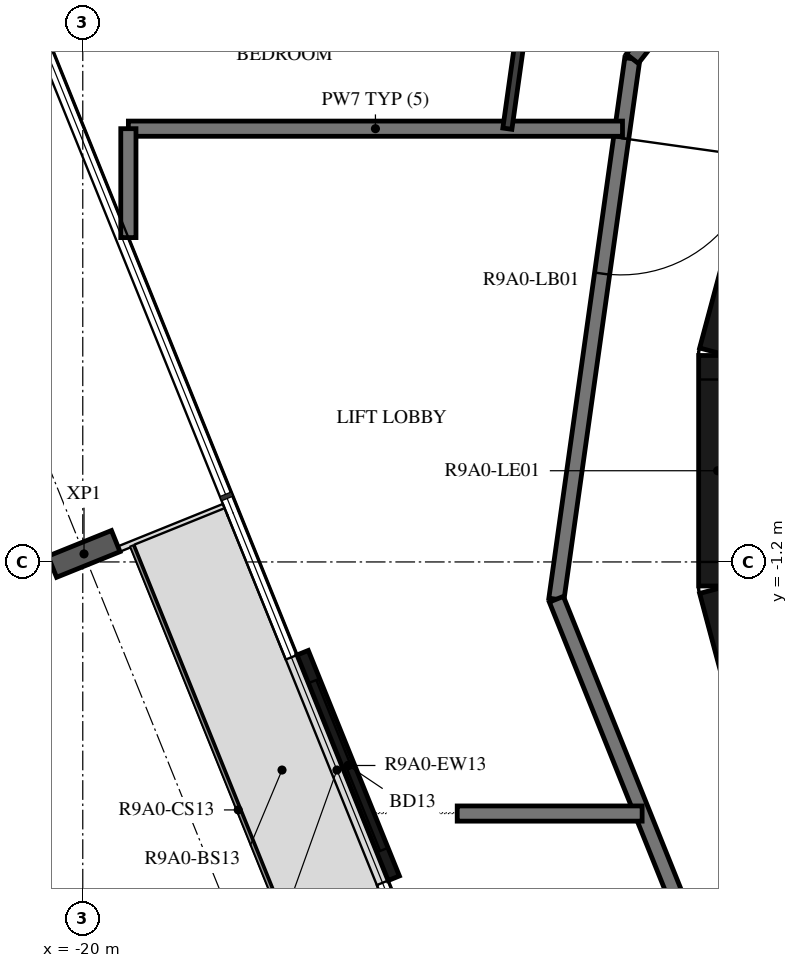
"""IFC4 building model, lengths in metres.
Left out: names, types, materials, properties, quantities, classifications, styles, units other than length and angle.
Written with IfcOpenShell. Run it as: python <this file> out.ifc"""

import sys

from ifc_helpers import new_model, si_unit, direction, frame, frame_2d, origin, origin_2d, place, context, subcontext, project, spatial, rectangle, i_section, extrude, element, fill, save


model = new_model("IFC4")
c1 = context("Model", 3, precision=1e-05, world=origin(), true_north=direction((0.0, 1.0)))
c2 = subcontext(c1, "Body", "Model", "MODEL_VIEW")
j1 = project(units=[si_unit("LENGTHUNIT", "METRE"), si_unit("PLANEANGLEUNIT", "RADIAN")], contexts=[c1])
p1 = place(None, origin())
s1 = spatial("IfcSite", under=j1, at=p1, CompositionType="ELEMENT")
p2 = place(p1, origin())
s2 = spatial("IfcBuilding", under=s1, at=p2, CompositionType="ELEMENT")
p3 = place(p2, frame((0.0, 0.0, 340.0)))
s3 = spatial("IfcBuildingStorey", under=s2, at=p3, CompositionType="ELEMENT", Elevation=340.0)
p4 = place(p3, frame((-19.984, -1.094, -0.38), z_axis=(0.0, 0.0, 1.0), x_axis=(-0.374606892434, 0.927183733755, 0.0)))
e1 = element("IfcColumn", 1, at=p4, inside=s3, PredefinedType="COLUMN", context=c2, shape_type="SweptSolid", body=[
    extrude(i_section(OverallWidth=0.3, OverallDepth=0.9, WebThickness=0.019, FlangeThickness=0.035, FilletRadius=0.03, at=origin_2d()), origin(), (0.0, 0.0, 1.0), 3.5),
])
p5 = place(p3, frame((-17.107, -2.394, 0.0), z_axis=(0.0, 0.0, 1.0), x_axis=(0.374598019739, -0.927187318511, 0.0)))
e2 = element("IfcWall", 2, at=p5, inside=s3, PredefinedType="STANDARD", context=c2, shape_type="SweptSolid", body=[
    extrude(rectangle(XDim=3.2, YDim=0.16, at=frame_2d((1.6, 0.0))), origin(), (0.0, 0.0, 1.0), 3.12),
])
p6 = place(p5, frame((0.4, 0.0, 0.0)))
e3 = element("IfcOpeningElement", 3, at=p6, cuts=e2, PredefinedType="OPENING", context=c2, shape_type="SweptSolid", body=[
    extrude(rectangle(XDim=2.4, YDim=2.4, at=frame_2d((1.2, 1.2))), frame((0.0, 0.09, 0.0), z_axis=(0.0, -1.0, 0.0), x_axis=(1.0, 0.0, 0.0)), (0.0, 0.0, 1.0), 0.18),
])
p7 = place(p3, frame((-10.858, 4.479, 0.0), z_axis=(0.0, 0.0, 1.0), x_axis=(-0.258734743916, -0.965948410781, 0.0)))
e4 = element("IfcWall", 4, at=p7, inside=s3, PredefinedType="SHEAR", context=c2, shape_type="SweptSolid", body=[
    extrude(rectangle(XDim=3.033, YDim=0.5, at=frame_2d((1.516, 0.0))), origin(), (0.0, 0.0, 1.0), 3.12),
])
p8 = place(p3, frame((-11.647, 1.516, 0.0), z_axis=(0.0, 0.0, 1.0), x_axis=(0.0, -1.0, 0.0)))
e5 = element("IfcWall", 5, at=p8, inside=s3, PredefinedType="SHEAR", context=c2, shape_type="SweptSolid", body=[
    extrude(rectangle(XDim=3.033, YDim=0.5, at=frame_2d((1.516, 0.0))), origin(), (0.0, 0.0, 1.0), 3.12),
])
p9 = place(p8, frame((0.316, 0.0, 0.0)))
e6 = element("IfcOpeningElement", 6, at=p9, cuts=e5, PredefinedType="OPENING", context=c2, shape_type="SweptSolid", body=[
    extrude(rectangle(XDim=2.4, YDim=2.1, at=frame_2d((1.2, 1.05))), frame((0.0, 0.26, 0.0), z_axis=(0.0, -1.0, 0.0), x_axis=(1.0, 0.0, 0.0)), (0.0, 0.0, 1.0), 0.52),
])
p10 = place(p3, frame((-11.643, -1.55, 0.0), z_axis=(0.0, 0.0, 1.0), x_axis=(0.258734743916, -0.965948410781, 0.0)))
e7 = element("IfcWall", 7, at=p10, inside=s3, PredefinedType="SHEAR", context=c2, shape_type="SweptSolid", body=[
    extrude(rectangle(XDim=3.033, YDim=0.5, at=frame_2d((1.516, 0.0))), origin(), (0.0, 0.0, 1.0), 3.12),
])
p11 = place(p10, frame((1.066, 0.0, 0.0)))
e8 = element("IfcOpeningElement", 8, at=p11, cuts=e7, PredefinedType="OPENING", context=c2, shape_type="SweptSolid", body=[
    extrude(rectangle(XDim=0.9, YDim=2.1, at=frame_2d((0.45, 1.05))), frame((0.0, 0.26, 0.0), z_axis=(0.0, -1.0, 0.0), x_axis=(1.0, 0.0, 0.0)), (0.0, 0.0, 1.0), 0.52),
])
p12 = place(p3, frame((-12.77, 5.42, 0.0), z_axis=(0.0, 0.0, 1.0), x_axis=(-0.139155334385, -0.990270565508, 0.0)))
e9 = element("IfcWall", 9, at=p12, inside=s3, PredefinedType="STANDARD", context=c2, shape_type="SweptSolid", body=[
    extrude(rectangle(XDim=7.181, YDim=0.2, at=frame_2d((3.59, 0.0))), origin(), (0.0, 0.0, 1.0), 3.12),
])
p13 = place(p12, frame((1.055, 0.0, 0.0)))
e10 = element("IfcOpeningElement", 10, at=p13, cuts=e9, PredefinedType="OPENING", context=c2, shape_type="SweptSolid", body=[
    extrude(rectangle(XDim=1.8, YDim=2.1, at=frame_2d((0.9, 1.05))), frame((0.0, 0.11, 0.0), z_axis=(0.0, -1.0, 0.0), x_axis=(1.0, 0.0, 0.0)), (0.0, 0.0, 1.0), 0.22),
])
p14 = place(p3, frame((-13.769, -1.691, 0.0), z_axis=(0.0, 0.0, 1.0), x_axis=(0.372720094028, -0.927943819155, 0.0)))
e11 = element("IfcWall", 11, at=p14, inside=s3, PredefinedType="STANDARD", context=c2, shape_type="SweptSolid", body=[
    extrude(rectangle(XDim=4.875, YDim=0.2, at=frame_2d((2.438, 0.0))), origin(), (0.0, 0.0, 1.0), 3.12),
])
p15 = place(p3, frame((-8.349, 11.079, 0.0), z_axis=(0.0, 0.0, 1.0), x_axis=(-0.615669112324, -0.78800478687, 0.0)))
e12 = element("IfcWall", 12, at=p15, inside=s3, PredefinedType="STANDARD", context=c2, shape_type="SweptSolid", body=[
    extrude(rectangle(XDim=7.181, YDim=0.2, at=frame_2d((3.591, 0.0))), origin(), (0.0, 0.0, 1.0), 3.12),
])
p16 = place(p15, frame((2.1, 0.0, 0.0)))
e13 = element("IfcOpeningElement", 13, at=p16, cuts=e12, PredefinedType="OPENING", context=c2, shape_type="SweptSolid", body=[
    extrude(rectangle(XDim=1.0, YDim=2.1, at=frame_2d((0.5, 1.05))), frame((0.0, 0.11, 0.0), z_axis=(0.0, -1.0, 0.0), x_axis=(1.0, 0.0, 0.0)), (0.0, 0.0, 1.0), 0.22),
])
p17 = place(p15, frame((3.811, 0.0, 0.0)))
e14 = element("IfcOpeningElement", 14, at=p17, cuts=e12, PredefinedType="OPENING", context=c2, shape_type="SweptSolid", body=[
    extrude(rectangle(XDim=1.0, YDim=2.1, at=frame_2d((0.5, 1.05))), frame((0.0, 0.11, 0.0), z_axis=(0.0, -1.0, 0.0), x_axis=(1.0, 0.0, 0.0)), (0.0, 0.0, 1.0), 0.22),
])
p18 = place(p3, frame((-12.899, 4.5, 0.0), z_axis=(0.0, 0.0, 1.0), x_axis=(-1.0, 0.0, 0.0)))
e15 = element("IfcWall", 15, at=p18, inside=s3, PredefinedType="STANDARD", context=c2, shape_type="SweptSolid", body=[
    extrude(rectangle(XDim=6.5, YDim=0.2, at=frame_2d((3.25, 0.0))), origin(), (0.0, 0.0, 1.0), 3.12),
])
p19 = place(p3, frame((-19.4, 4.5, 0.0), z_axis=(0.0, 0.0, 1.0), x_axis=(0.0, -1.0, 0.0)))
e16 = element("IfcWall", 16, at=p19, inside=s3, PredefinedType="STANDARD", context=c2, shape_type="SweptSolid", body=[
    extrude(rectangle(XDim=1.433, YDim=0.2, at=frame_2d((0.716, 0.0))), origin(), (0.0, 0.0, 1.0), 3.12),
])
p20 = place(p3, frame((-15.074, -4.51, 0.0), z_axis=(0.0, 0.0, 1.0), x_axis=(1.0, 0.0, 0.0)))
e17 = element("IfcWall", 17, at=p20, inside=s3, PredefinedType="STANDARD", context=c2, shape_type="SweptSolid", body=[
    extrude(rectangle(XDim=2.433, YDim=0.2, at=frame_2d((1.216, 0.0))), origin(), (0.0, 0.0, 1.0), 3.12),
])
p21 = place(p3, frame((-14.248, 5.683, 0.0), z_axis=(0.0, 0.0, 1.0), x_axis=(-0.139189066398, -0.990265824814, 0.0)))
e18 = element("IfcWall", 18, at=p21, inside=s3, PredefinedType="PARTITIONING", context=c2, shape_type="SweptSolid", body=[
    extrude(rectangle(XDim=1.195, YDim=0.12, at=frame_2d((0.597, 0.0))), origin(), (0.0, 0.0, 1.0), 3.12),
])
p22 = place(p6, origin())
e19 = element("IfcDoor", 19, at=p22, inside=s3, OperationType="DOUBLE_DOOR_SLIDING", PredefinedType="DOOR", context=c2, shape_type="SweptSolid", body=[
    extrude(rectangle(XDim=2.4, YDim=2.4, at=frame_2d((1.2, 1.2))), frame((0.0, 0.025, 0.0), z_axis=(0.0, -1.0, 0.0), x_axis=(1.0, 0.0, 0.0)), (0.0, 0.0, 1.0), 0.05),
])
fill(e3, e19)
p23 = place(p9, origin())
e20 = element("IfcDoor", 20, at=p23, inside=s3, OperationType="DOUBLE_DOOR_SINGLE_SWING", PredefinedType="DOOR", context=c2, shape_type="SweptSolid", body=[
    extrude(rectangle(XDim=2.4, YDim=2.1, at=frame_2d((1.2, 1.05))), frame((0.0, 0.025, 0.0), z_axis=(0.0, -1.0, 0.0), x_axis=(1.0, 0.0, 0.0)), (0.0, 0.0, 1.0), 0.05),
])
fill(e6, e20)
p24 = place(p13, origin())
e21 = element("IfcDoor", 21, at=p24, inside=s3, OperationType="DOUBLE_DOOR_SINGLE_SWING", PredefinedType="DOOR", context=c2, shape_type="SweptSolid", body=[
    extrude(rectangle(XDim=1.8, YDim=2.1, at=frame_2d((0.9, 1.05))), frame((0.0, 0.025, 0.0), z_axis=(0.0, -1.0, 0.0), x_axis=(1.0, 0.0, 0.0)), (0.0, 0.0, 1.0), 0.05),
])
fill(e10, e21)
save(model, sys.argv[1])
